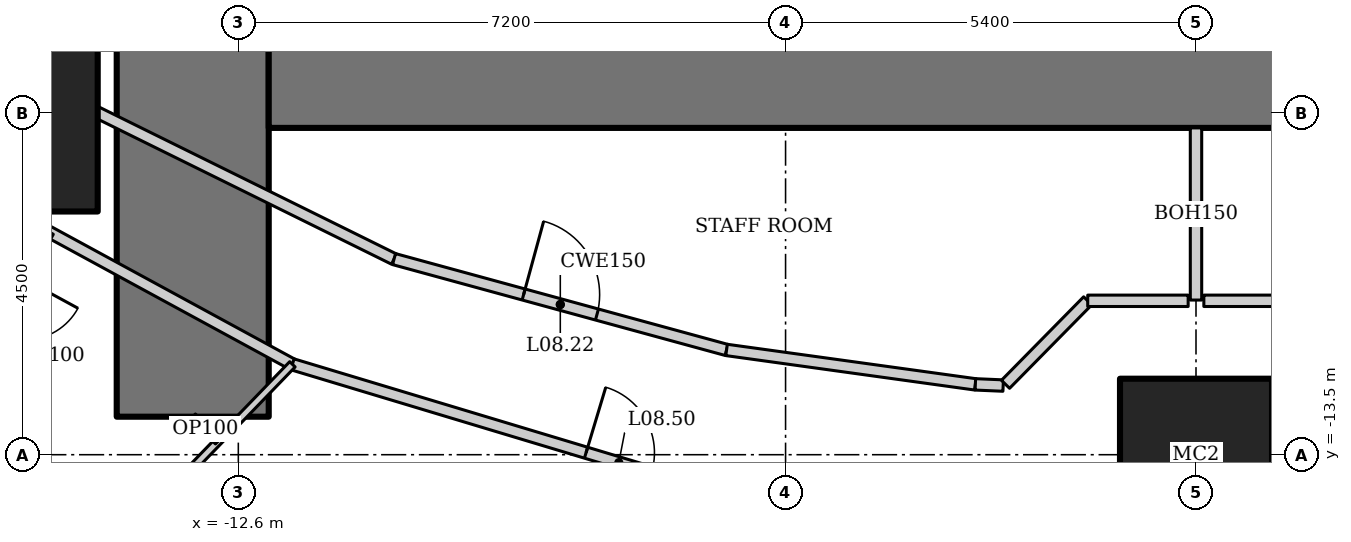
"""IFC4 building model, lengths in metres.
Left out: names, types, materials, properties, quantities, classifications, styles, units other than length and angle.
Written with IfcOpenShell. Run it as: python <this file> out.ifc"""

import sys

from ifc_helpers import new_model, si_unit, direction, frame, frame_2d, origin, origin_2d, place, context, subcontext, project, spatial, rectangle, hollow_rectangle, extrude, element, fill, save


model = new_model("IFC4")
c1 = context("Model", 3, precision=1e-05, world=origin(), true_north=direction((0.0, 1.0)))
c2 = subcontext(c1, "Body", "Model", "MODEL_VIEW")
j1 = project(units=[si_unit("LENGTHUNIT", "METRE"), si_unit("PLANEANGLEUNIT", "RADIAN")], contexts=[c1])
p1 = place(None, origin())
s1 = spatial("IfcSite", under=j1, at=p1, CompositionType="ELEMENT")
p2 = place(p1, origin())
s2 = spatial("IfcBuilding", under=s1, at=p2, CompositionType="ELEMENT")
p3 = place(p2, frame((0.0, 0.0, 44.2)))
s3 = spatial("IfcBuildingStorey", under=s2, at=p3, CompositionType="ELEMENT", Elevation=44.2)
p4 = place(p3, frame((-15.75, -9.0, 0.0), z_axis=(0.0, 0.0, 1.0), x_axis=(1.0, 0.0, 0.0)))
e1 = element("IfcColumn", 1, at=p4, inside=s3, PredefinedType="COLUMN", context=c2, shape_type="SweptSolid", body=[
    extrude(hollow_rectangle(XDim=2.6, YDim=2.6, WallThickness=0.13, at=origin_2d()), origin(), (0.0, 0.0, 1.0), 3.6),
])
p5 = place(p3, frame((0.0, -13.5, 0.0), z_axis=(0.0, 0.0, 1.0), x_axis=(1.0, 0.0, 0.0)))
e2 = element("IfcColumn", 2, at=p5, inside=s3, PredefinedType="COLUMN", context=c2, shape_type="SweptSolid", body=[
    extrude(hollow_rectangle(XDim=2.0, YDim=2.0, WallThickness=0.17, at=origin_2d()), origin(), (0.0, 0.0, 1.0), 3.6),
])
p6 = place(p3, frame((-13.2, 13.0, 0.0), z_axis=(0.0, 0.0, 1.0), x_axis=(0.0, -1.0, 0.0)))
e3 = element("IfcWall", 3, at=p6, inside=s3, PredefinedType="SHEAR", context=c2, shape_type="SweptSolid", body=[
    extrude(rectangle(XDim=26.0, YDim=2.0, at=frame_2d((13.0, 0.0))), origin(), (0.0, 0.0, 1.0), 3.6),
])
p7 = place(p6, frame((12.1, 0.0, 0.0)))
e4 = element("IfcOpeningElement", 4, at=p7, cuts=e3, PredefinedType="OPENING", context=c2, shape_type="SweptSolid", body=[
    extrude(rectangle(XDim=1.8, YDim=2.1, at=frame_2d((0.9, 1.05))), frame((0.0, 1.01, 0.0), z_axis=(0.0, -1.0, 0.0), x_axis=(1.0, 0.0, 0.0)), (0.0, 0.0, 1.0), 2.02),
])
p8 = place(p3, frame((-12.2, -8.0, 0.0), z_axis=(0.0, 0.0, 1.0), x_axis=(1.0, 0.0, 0.0)))
e5 = element("IfcWall", 5, at=p8, inside=s3, PredefinedType="SHEAR", context=c2, shape_type="SweptSolid", body=[
    extrude(rectangle(XDim=24.4, YDim=2.4, at=frame_2d((12.2, 0.0))), origin(), (0.0, 0.0, 1.0), 3.6),
])
p9 = place(p3, frame((-16.835, -9.62, 0.0), z_axis=(0.0, 0.0, 1.0), x_axis=(0.878450059298, -0.477834169267, 0.0)))
e6 = element("IfcWall", 6, at=p9, inside=s3, PredefinedType="PARTITIONING", context=c2, shape_type="SweptSolid", body=[
    extrude(rectangle(XDim=5.631, YDim=0.15, at=frame_2d((2.815, 0.0))), origin(), (0.0, 0.0, 1.0), 3.45),
])
p10 = place(p3, frame((-11.888, -12.311, 0.0), z_axis=(0.0, 0.0, 1.0), x_axis=(0.957564241242, -0.288219922793, 0.0)))
e7 = element("IfcWall", 7, at=p10, inside=s3, PredefinedType="PARTITIONING", context=c2, shape_type="SweptSolid", body=[
    extrude(rectangle(XDim=5.085, YDim=0.15, at=frame_2d((2.542, 0.0))), origin(), (0.0, 0.0, 1.0), 3.45),
])
p11 = place(p10, frame((4.035, 0.0, 0.0)))
e8 = element("IfcOpeningElement", 8, at=p11, cuts=e7, PredefinedType="OPENING", context=c2, shape_type="SweptSolid", body=[
    extrude(rectangle(XDim=0.9, YDim=2.1, at=frame_2d((0.45, 1.05))), frame((0.0, 0.085, 0.0), z_axis=(0.0, -1.0, 0.0), x_axis=(1.0, 0.0, 0.0)), (0.0, 0.0, 1.0), 0.17),
])
p12 = place(p3, frame((-15.147, -8.656, 0.0), z_axis=(0.0, 0.0, 1.0), x_axis=(0.89656943448, -0.442903205177, 0.0)))
e9 = element("IfcWall", 9, at=p12, inside=s3, PredefinedType="PARTITIONING", context=c2, shape_type="SweptSolid", body=[
    extrude(rectangle(XDim=5.126, YDim=0.15, at=frame_2d((2.563, 0.0))), origin(), (0.0, 0.0, 1.0), 3.45),
])
p13 = place(p3, frame((-10.551, -10.926, 0.0), z_axis=(0.0, 0.0, 1.0), x_axis=(0.964644466646, -0.263554648923, 0.0)))
e10 = element("IfcWall", 10, at=p13, inside=s3, PredefinedType="PARTITIONING", context=c2, shape_type="SweptSolid", body=[
    extrude(rectangle(XDim=4.535, YDim=0.15, at=frame_2d((2.268, 0.0))), origin(), (0.0, 0.0, 1.0), 3.45),
])
p14 = place(p13, frame((1.768, 0.0, 0.0)))
e11 = element("IfcOpeningElement", 11, at=p14, cuts=e10, PredefinedType="OPENING", context=c2, shape_type="SweptSolid", body=[
    extrude(rectangle(XDim=1.0, YDim=2.1, at=frame_2d((0.5, 1.05))), frame((0.0, 0.085, 0.0), z_axis=(0.0, -1.0, 0.0), x_axis=(1.0, 0.0, 0.0)), (0.0, 0.0, 1.0), 0.17),
])
p15 = place(p3, frame((-6.176, -12.122, 0.0), z_axis=(0.0, 0.0, 1.0), x_axis=(0.990563451353, -0.137054911782, 0.0)))
e12 = element("IfcWall", 12, at=p15, inside=s3, PredefinedType="PARTITIONING", context=c2, shape_type="SweptSolid", body=[
    extrude(rectangle(XDim=3.304, YDim=0.15, at=frame_2d((1.652, 0.0))), origin(), (0.0, 0.0, 1.0), 3.45),
])
p16 = place(p3, frame((-15.078, -10.576, 0.0), z_axis=(0.0, 0.0, 1.0), x_axis=(-0.477832549678, -0.878450940274, 0.0)))
e13 = element("IfcWall", 13, at=p16, inside=s3, PredefinedType="PARTITIONING", context=c2, shape_type="SweptSolid", body=[
    extrude(rectangle(XDim=2.4, YDim=0.1, at=frame_2d((1.2, 0.0))), origin(), (0.0, 0.0, 1.0), 3.45),
])
p17 = place(p16, frame((0.7, 0.0, 0.0)))
e14 = element("IfcOpeningElement", 14, at=p17, cuts=e13, PredefinedType="OPENING", context=c2, shape_type="SweptSolid", body=[
    extrude(rectangle(XDim=0.8, YDim=2.1, at=frame_2d((0.4, 1.05))), frame((0.0, 0.06, 0.0), z_axis=(0.0, -1.0, 0.0), x_axis=(1.0, 0.0, 0.0)), (0.0, 0.0, 1.0), 0.12),
])
p18 = place(p3, frame((-16.944, -17.545, 0.0), z_axis=(0.0, 0.0, 1.0), x_axis=(0.694669949151, 0.719328618746, 0.0)))
e15 = element("IfcWall", 15, at=p18, inside=s3, PredefinedType="PARTITIONING", context=c2, shape_type="SweptSolid", body=[
    extrude(rectangle(XDim=7.277, YDim=0.1, at=frame_2d((3.639, 0.0))), origin(), (0.0, 0.0, 1.0), 2.528),
])
p19 = place(p18, frame((3.189, 0.0, 0.0)))
e16 = element("IfcOpeningElement", 16, at=p19, cuts=e15, PredefinedType="OPENING", context=c2, shape_type="SweptSolid", body=[
    extrude(rectangle(XDim=0.9, YDim=2.1, at=frame_2d((0.45, 1.05))), frame((0.0, 0.06, 0.0), z_axis=(0.0, -1.0, 0.0), x_axis=(1.0, 0.0, 0.0)), (0.0, 0.0, 1.0), 0.12),
])
p20 = place(p3, frame((-13.2, -13.0, 0.0), z_axis=(0.0, 0.0, 1.0), x_axis=(0.719347134512, -0.69465077562, 0.0)))
e17 = element("IfcWall", 17, at=p20, inside=s3, PredefinedType="PARTITIONING", context=c2, shape_type="SweptSolid", body=[
    extrude(rectangle(XDim=0.465, YDim=0.1, at=frame_2d((0.232, 0.0))), origin(), (0.0, 0.0, 1.0), 3.45),
])
p21 = place(p3, frame((-2.903, -12.574, 0.0), z_axis=(0.0, 0.0, 1.0), x_axis=(0.999061181733, -0.04332153223, 0.0)))
e18 = element("IfcWall", 18, at=p21, inside=s3, PredefinedType="PARTITIONING", context=c2, shape_type="SweptSolid", body=[
    extrude(rectangle(XDim=0.366, YDim=0.15, at=frame_2d((0.183, 0.0))), origin(), (0.0, 0.0, 1.0), 3.45),
])
p22 = place(p3, frame((0.0, -9.2, 0.0), z_axis=(0.0, 0.0, 1.0), x_axis=(0.0, -1.0, 0.0)))
e19 = element("IfcWall", 19, at=p22, inside=s3, PredefinedType="PARTITIONING", context=c2, shape_type="SweptSolid", body=[
    extrude(rectangle(XDim=2.265, YDim=0.15, at=frame_2d((1.133, 0.0))), origin(), (0.0, 0.0, 1.0), 3.044),
])
p23 = place(p3, frame((-2.506, -12.574, 0.0), z_axis=(0.0, 0.0, 1.0), x_axis=(0.701622806479, 0.712548550927, 0.0)))
e20 = element("IfcWall", 20, at=p23, inside=s3, PredefinedType="PARTITIONING", context=c2, shape_type="SweptSolid", body=[
    extrude(rectangle(XDim=1.542, YDim=0.15, at=frame_2d((0.771, 0.0))), origin(), (0.0, 0.0, 1.0), 3.45),
])
for number, where, z_axis, x_axis in (
    (21, (-1.425, -11.475, 0.0), (0.0, 0.0, 1.0), (1.0, 0.0, 0.0)),
    (22, (0.103, -11.475, 0.0), (0.0, 0.0, 1.0), (1.0, 0.0, 0.0)),
):
    element("IfcWall", number, at=place(p3, frame(where, z_axis=z_axis, x_axis=x_axis)), inside=s3, PredefinedType="PARTITIONING", context=c2, shape_type="SweptSolid", body=[
        extrude(rectangle(XDim=1.321, YDim=0.15, at=frame_2d((0.661, 0.0))), origin(), (0.0, 0.0, 1.0), 3.45),
    ])
p24 = place(p14, origin())
e23 = element("IfcDoor", 23, at=p24, inside=s3, OperationType="SINGLE_SWING_LEFT", PredefinedType="DOOR", context=c2, shape_type="SweptSolid", body=[
    extrude(rectangle(XDim=1.0, YDim=2.1, at=frame_2d((0.5, 1.05))), frame((0.0, 0.025, 0.0), z_axis=(0.0, -1.0, 0.0), x_axis=(1.0, 0.0, 0.0)), (0.0, 0.0, 1.0), 0.05),
])
fill(e11, e23)
p25 = place(p11, origin())
e24 = element("IfcDoor", 24, at=p25, inside=s3, OperationType="SINGLE_SWING_LEFT", PredefinedType="DOOR", context=c2, shape_type="SweptSolid", body=[
    extrude(rectangle(XDim=0.9, YDim=2.1, at=frame_2d((0.45, 1.05))), frame((0.0, 0.025, 0.0), z_axis=(0.0, -1.0, 0.0), x_axis=(1.0, 0.0, 0.0)), (0.0, 0.0, 1.0), 0.05),
])
fill(e8, e24)
save(model, sys.argv[1])
